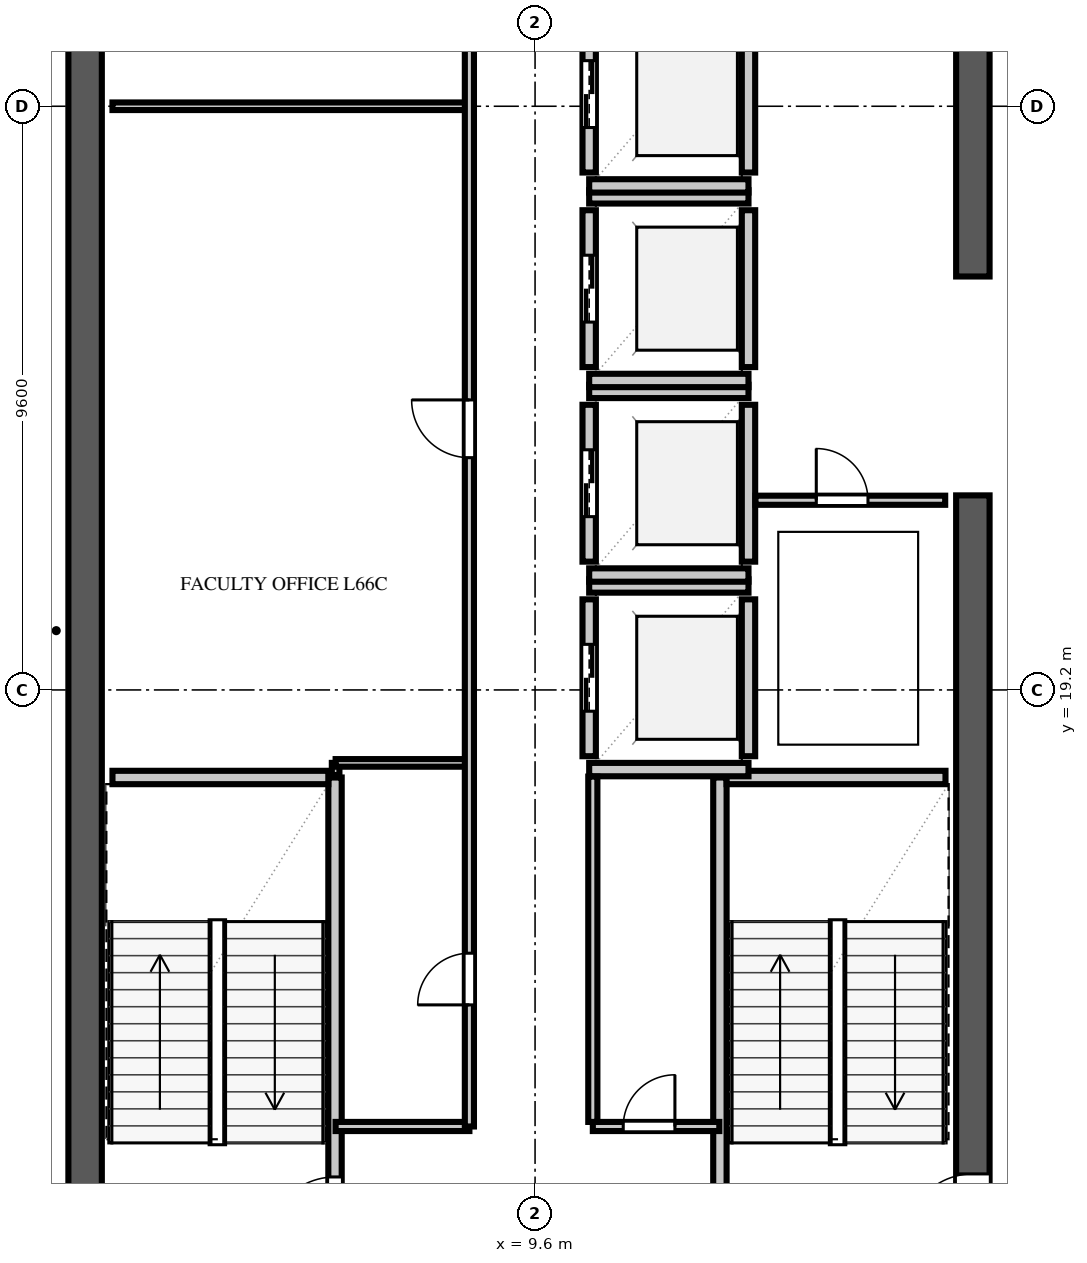
"""IFC4 building model, lengths in metres.
Left out: names, types, materials, properties, quantities, classifications, styles, units other than length and angle.
Written with IfcOpenShell. Run it as: python <this file> out.ifc"""

import sys

from ifc_helpers import new_model, si_unit, direction, frame, frame_2d, origin, place, context, subcontext, project, spatial, rectangle, extrude, element, fill, save


model = new_model("IFC4")
c1 = context("Model", 3, precision=1e-05, world=origin(), true_north=direction((0.0, 1.0)))
c2 = subcontext(c1, "Body", "Model", "MODEL_VIEW")
j1 = project(units=[si_unit("LENGTHUNIT", "METRE"), si_unit("PLANEANGLEUNIT", "RADIAN")], contexts=[c1])
p1 = place(None, origin())
s1 = spatial("IfcSite", under=j1, at=p1, CompositionType="ELEMENT")
p2 = place(p1, origin())
s2 = spatial("IfcBuilding", under=s1, at=p2, CompositionType="ELEMENT")
p3 = place(p2, frame((0.0, 0.0, 261.0)))
s3 = spatial("IfcBuildingStorey", under=s2, at=p3, CompositionType="ELEMENT", Elevation=261.0)
p4 = place(p3, frame((2.2, 9.325, 0.0), z_axis=(0.0, 0.0, 1.0), x_axis=(0.0, 1.0, 0.0)))
e1 = element("IfcWall", 1, at=p4, inside=s3, PredefinedType="SHEAR", context=c2, shape_type="SweptSolid", body=[
    extrude(rectangle(XDim=38.95, YDim=0.55, at=frame_2d((19.475, 0.0))), origin(), (0.0, 0.0, 1.0), 4.54),
])
p5 = place(p3, frame((16.8, 9.875, 0.0), z_axis=(0.0, 0.0, 1.0), x_axis=(0.0, 1.0, 0.0)))
e2 = element("IfcWall", 2, at=p5, inside=s3, PredefinedType="SHEAR", context=c2, shape_type="SweptSolid", body=[
    extrude(rectangle(XDim=12.525, YDim=0.55, at=frame_2d((6.262, 0.0))), origin(), (0.0, 0.0, 1.0), 4.54),
])
p6 = place(p5, frame((0.265, 0.0, 0.0)))
e3 = element("IfcOpeningElement", 3, at=p6, cuts=e2, PredefinedType="OPENING", context=c2, shape_type="SweptSolid", body=[
    extrude(rectangle(XDim=1.1, YDim=2.2, at=frame_2d((0.55, 1.1))), frame((0.0, 0.287, 0.0), z_axis=(0.0, -1.0, 0.0), x_axis=(1.0, 0.0, 0.0)), (0.0, 0.0, 1.0), 0.574),
])
p7 = place(p3, frame((16.8, 26.0, 0.0), z_axis=(0.0, 0.0, 1.0), x_axis=(0.0, 1.0, 0.0)))
e4 = element("IfcWall", 4, at=p7, inside=s3, PredefinedType="SHEAR", context=c2, shape_type="SweptSolid", body=[
    extrude(rectangle(XDim=7.8, YDim=0.55, at=frame_2d((3.9, 0.0))), origin(), (0.0, 0.0, 1.0), 4.54),
])
p8 = place(p3, frame((6.31, 9.95, 0.0), z_axis=(0.0, 0.0, 1.0), x_axis=(0.0, 1.0, 0.0)))
e5 = element("IfcWall", 5, at=p8, inside=s3, PredefinedType="SOLIDWALL", context=c2, shape_type="SweptSolid", body=[
    extrude(rectangle(XDim=7.81, YDim=0.22, at=frame_2d((3.905, 0.0))), origin(), (0.0, 0.0, 1.0), 4.54),
])
p9 = place(p8, frame((0.14, 0.0, 0.0)))
e6 = element("IfcOpeningElement", 6, at=p9, cuts=e5, PredefinedType="OPENING", context=c2, shape_type="SweptSolid", body=[
    extrude(rectangle(XDim=1.1, YDim=2.2, at=frame_2d((0.55, 1.1))), frame((0.0, 0.122, 0.0), z_axis=(0.0, -1.0, 0.0), x_axis=(1.0, 0.0, 0.0)), (0.0, 0.0, 1.0), 0.244),
])
p10 = place(p3, frame((2.65, 17.76, 0.0), z_axis=(0.0, 0.0, 1.0), x_axis=(1.0, 0.0, 0.0)))
e7 = element("IfcWall", 7, at=p10, inside=s3, PredefinedType="SOLIDWALL", context=c2, shape_type="SweptSolid", body=[
    extrude(rectangle(XDim=3.55, YDim=0.22, at=frame_2d((1.775, 0.0))), origin(), (0.0, 0.0, 1.0), 4.54),
])
p11 = place(p3, frame((12.64, 10.05, 0.0), z_axis=(0.0, 0.0, 1.0), x_axis=(0.0, 1.0, 0.0)))
e8 = element("IfcWall", 8, at=p11, inside=s3, PredefinedType="SOLIDWALL", context=c2, shape_type="SweptSolid", body=[
    extrude(rectangle(XDim=7.71, YDim=0.22, at=frame_2d((3.855, 0.0))), origin(), (0.0, 0.0, 1.0), 4.54),
])
p12 = place(p3, frame((12.75, 17.76, 0.0), z_axis=(0.0, 0.0, 1.0), x_axis=(1.0, 0.0, 0.0)))
e9 = element("IfcWall", 9, at=p12, inside=s3, PredefinedType="SOLIDWALL", context=c2, shape_type="SweptSolid", body=[
    extrude(rectangle(XDim=3.6, YDim=0.22, at=frame_2d((1.8, 0.0))), origin(), (0.0, 0.0, 1.0), 4.54),
])
p13 = place(p3, frame((10.49, 18.11, 0.0), z_axis=(0.0, 0.0, 1.0), x_axis=(0.0, 1.0, 0.0)))
e10 = element("IfcWall", 10, at=p13, inside=s3, PredefinedType="SOLIDWALL", context=c2, shape_type="SweptSolid", body=[
    extrude(rectangle(XDim=2.58, YDim=0.22, at=frame_2d((1.29, 0.0))), origin(), (0.0, 0.0, 1.0), 4.54),
])
p14 = place(p13, frame((0.74, 0.0, 0.0)))
e11 = element("IfcOpeningElement", 11, at=p14, cuts=e10, PredefinedType="OPENING", context=c2, shape_type="SweptSolid", body=[
    extrude(rectangle(XDim=1.1, YDim=2.2, at=frame_2d((0.55, 1.1))), frame((0.0, 0.122, 0.0), z_axis=(0.0, -1.0, 0.0), x_axis=(1.0, 0.0, 0.0)), (0.0, 0.0, 1.0), 0.244),
])
p15 = place(p3, frame((13.11, 18.11, 0.0), z_axis=(0.0, 0.0, 1.0), x_axis=(0.0, 1.0, 0.0)))
e12 = element("IfcWall", 12, at=p15, inside=s3, PredefinedType="SOLIDWALL", context=c2, shape_type="SweptSolid", body=[
    extrude(rectangle(XDim=2.58, YDim=0.22, at=frame_2d((1.29, 0.0))), origin(), (0.0, 0.0, 1.0), 4.54),
])
for number, where, z_axis, x_axis in (
    (13, (10.49, 17.89, 0.0), (0.0, 0.0, 1.0), (1.0, 0.0, 0.0)),
    (14, (10.49, 20.91, 0.0), (0.0, 0.0, 1.0), (1.0, 0.0, 0.0)),
):
    element("IfcWall", number, at=place(p3, frame(where, z_axis=z_axis, x_axis=x_axis)), inside=s3, PredefinedType="SOLIDWALL", context=c2, shape_type="SweptSolid", body=[
        extrude(rectangle(XDim=2.62, YDim=0.22, at=frame_2d((1.31, 0.0))), origin(), (0.0, 0.0, 1.0), 4.54),
    ])
p16 = place(p3, frame((10.49, 21.31, 0.0), z_axis=(0.0, 0.0, 1.0), x_axis=(0.0, 1.0, 0.0)))
e15 = element("IfcWall", 15, at=p16, inside=s3, PredefinedType="SOLIDWALL", context=c2, shape_type="SweptSolid", body=[
    extrude(rectangle(XDim=2.58, YDim=0.22, at=frame_2d((1.29, 0.0))), origin(), (0.0, 0.0, 1.0), 4.54),
])
p17 = place(p16, frame((0.74, 0.0, 0.0)))
e16 = element("IfcOpeningElement", 16, at=p17, cuts=e15, PredefinedType="OPENING", context=c2, shape_type="SweptSolid", body=[
    extrude(rectangle(XDim=1.1, YDim=2.2, at=frame_2d((0.55, 1.1))), frame((0.0, 0.122, 0.0), z_axis=(0.0, -1.0, 0.0), x_axis=(1.0, 0.0, 0.0)), (0.0, 0.0, 1.0), 0.244),
])
p18 = place(p3, frame((13.11, 21.31, 0.0), z_axis=(0.0, 0.0, 1.0), x_axis=(0.0, 1.0, 0.0)))
e17 = element("IfcWall", 17, at=p18, inside=s3, PredefinedType="SOLIDWALL", context=c2, shape_type="SweptSolid", body=[
    extrude(rectangle(XDim=2.58, YDim=0.22, at=frame_2d((1.29, 0.0))), origin(), (0.0, 0.0, 1.0), 4.54),
])
for number, where, z_axis, x_axis in (
    (18, (10.49, 21.09, 0.0), (0.0, 0.0, 1.0), (1.0, 0.0, 0.0)),
    (19, (10.49, 24.11, 0.0), (0.0, 0.0, 1.0), (1.0, 0.0, 0.0)),
):
    element("IfcWall", number, at=place(p3, frame(where, z_axis=z_axis, x_axis=x_axis)), inside=s3, PredefinedType="SOLIDWALL", context=c2, shape_type="SweptSolid", body=[
        extrude(rectangle(XDim=2.62, YDim=0.22, at=frame_2d((1.31, 0.0))), origin(), (0.0, 0.0, 1.0), 4.54),
    ])
p19 = place(p3, frame((10.49, 24.51, 0.0), z_axis=(0.0, 0.0, 1.0), x_axis=(0.0, 1.0, 0.0)))
e20 = element("IfcWall", 20, at=p19, inside=s3, PredefinedType="SOLIDWALL", context=c2, shape_type="SweptSolid", body=[
    extrude(rectangle(XDim=2.58, YDim=0.22, at=frame_2d((1.29, 0.0))), origin(), (0.0, 0.0, 1.0), 4.54),
])
p20 = place(p19, frame((0.74, 0.0, 0.0)))
e21 = element("IfcOpeningElement", 21, at=p20, cuts=e20, PredefinedType="OPENING", context=c2, shape_type="SweptSolid", body=[
    extrude(rectangle(XDim=1.1, YDim=2.2, at=frame_2d((0.55, 1.1))), frame((0.0, 0.122, 0.0), z_axis=(0.0, -1.0, 0.0), x_axis=(1.0, 0.0, 0.0)), (0.0, 0.0, 1.0), 0.244),
])
p21 = place(p3, frame((13.11, 24.51, 0.0), z_axis=(0.0, 0.0, 1.0), x_axis=(0.0, 1.0, 0.0)))
e22 = element("IfcWall", 22, at=p21, inside=s3, PredefinedType="SOLIDWALL", context=c2, shape_type="SweptSolid", body=[
    extrude(rectangle(XDim=2.58, YDim=0.22, at=frame_2d((1.29, 0.0))), origin(), (0.0, 0.0, 1.0), 4.54),
])
for number, where, z_axis, x_axis in (
    (23, (10.49, 24.29, 0.0), (0.0, 0.0, 1.0), (1.0, 0.0, 0.0)),
    (24, (10.49, 27.31, 0.0), (0.0, 0.0, 1.0), (1.0, 0.0, 0.0)),
):
    element("IfcWall", number, at=place(p3, frame(where, z_axis=z_axis, x_axis=x_axis)), inside=s3, PredefinedType="SOLIDWALL", context=c2, shape_type="SweptSolid", body=[
        extrude(rectangle(XDim=2.62, YDim=0.22, at=frame_2d((1.31, 0.0))), origin(), (0.0, 0.0, 1.0), 4.54),
    ])
p22 = place(p3, frame((10.49, 27.71, 0.0), z_axis=(0.0, 0.0, 1.0), x_axis=(0.0, 1.0, 0.0)))
e25 = element("IfcWall", 25, at=p22, inside=s3, PredefinedType="SOLIDWALL", context=c2, shape_type="SweptSolid", body=[
    extrude(rectangle(XDim=2.58, YDim=0.22, at=frame_2d((1.29, 0.0))), origin(), (0.0, 0.0, 1.0), 4.54),
])
p23 = place(p22, frame((0.74, 0.0, 0.0)))
e26 = element("IfcOpeningElement", 26, at=p23, cuts=e25, PredefinedType="OPENING", context=c2, shape_type="SweptSolid", body=[
    extrude(rectangle(XDim=1.1, YDim=2.2, at=frame_2d((0.55, 1.1))), frame((0.0, 0.122, 0.0), z_axis=(0.0, -1.0, 0.0), x_axis=(1.0, 0.0, 0.0)), (0.0, 0.0, 1.0), 0.244),
])
p24 = place(p3, frame((13.11, 27.71, 0.0), z_axis=(0.0, 0.0, 1.0), x_axis=(0.0, 1.0, 0.0)))
e27 = element("IfcWall", 27, at=p24, inside=s3, PredefinedType="SOLIDWALL", context=c2, shape_type="SweptSolid", body=[
    extrude(rectangle(XDim=2.58, YDim=0.22, at=frame_2d((1.29, 0.0))), origin(), (0.0, 0.0, 1.0), 4.54),
])
p25 = place(p3, frame((10.49, 27.49, 0.0), z_axis=(0.0, 0.0, 1.0), x_axis=(1.0, 0.0, 0.0)))
e28 = element("IfcWall", 28, at=p25, inside=s3, PredefinedType="SOLIDWALL", context=c2, shape_type="SweptSolid", body=[
    extrude(rectangle(XDim=2.62, YDim=0.22, at=frame_2d((1.31, 0.0))), origin(), (0.0, 0.0, 1.0), 4.54),
])
p26 = place(p3, frame((10.55, 12.02, 0.0), z_axis=(0.0, 0.0, 1.0), x_axis=(1.0, 0.0, 0.0)))
e29 = element("IfcWall", 29, at=p26, inside=s3, PredefinedType="PARTITIONING", context=c2, shape_type="SweptSolid", body=[
    extrude(rectangle(XDim=2.08, YDim=0.15, at=frame_2d((1.04, 0.0))), origin(), (0.0, 0.0, 1.0), 4.54),
])
p27 = place(p26, frame((0.5, 0.0, 0.0)))
e30 = element("IfcOpeningElement", 30, at=p27, cuts=e29, PredefinedType="OPENING", context=c2, shape_type="SweptSolid", body=[
    extrude(rectangle(XDim=0.85, YDim=2.1, at=frame_2d((0.425, 1.05))), frame((0.0, 0.087, 0.0), z_axis=(0.0, -1.0, 0.0), x_axis=(1.0, 0.0, 0.0)), (0.0, 0.0, 1.0), 0.174),
])
p28 = place(p3, frame((10.55, 12.095, 0.0), z_axis=(0.0, 0.0, 1.0), x_axis=(0.0, 1.0, 0.0)))
e31 = element("IfcWall", 31, at=p28, inside=s3, PredefinedType="PARTITIONING", context=c2, shape_type="SweptSolid", body=[
    extrude(rectangle(XDim=5.68, YDim=0.15, at=frame_2d((2.84, 0.0))), origin(), (0.0, 0.0, 1.0), 4.54),
])
p29 = place(p3, frame((13.225, 22.32, 0.0), z_axis=(0.0, 0.0, 1.0), x_axis=(1.0, 0.0, 0.0)))
e32 = element("IfcWall", 32, at=p29, inside=s3, PredefinedType="PARTITIONING", context=c2, shape_type="SweptSolid", body=[
    extrude(rectangle(XDim=3.12, YDim=0.15, at=frame_2d((1.56, 0.0))), origin(), (0.0, 0.0, 1.0), 4.54),
])
p30 = place(p29, frame((1.0, 0.0, 0.0)))
e33 = element("IfcOpeningElement", 33, at=p30, cuts=e32, PredefinedType="OPENING", context=c2, shape_type="SweptSolid", body=[
    extrude(rectangle(XDim=0.85, YDim=2.1, at=frame_2d((0.425, 1.05))), frame((0.0, 0.087, 0.0), z_axis=(0.0, -1.0, 0.0), x_axis=(1.0, 0.0, 0.0)), (0.0, 0.0, 1.0), 0.174),
])
p31 = place(p3, frame((6.32, 12.02, 0.0), z_axis=(0.0, 0.0, 1.0), x_axis=(1.0, 0.0, 0.0)))
e34 = element("IfcWall", 34, at=p31, inside=s3, PredefinedType="PARTITIONING", context=c2, shape_type="SweptSolid", body=[
    extrude(rectangle(XDim=2.2, YDim=0.15, at=frame_2d((1.1, 0.0))), origin(), (0.0, 0.0, 1.0), 4.54),
])
p32 = place(p3, frame((6.32, 17.8, 0.0), z_axis=(0.0, 0.0, 1.0), x_axis=(0.0, 1.0, 0.0)))
e35 = element("IfcWall", 35, at=p32, inside=s3, PredefinedType="PARTITIONING", context=c2, shape_type="SweptSolid", body=[
    extrude(rectangle(XDim=0.2, YDim=0.125, at=frame_2d((0.1, 0.0))), origin(), (0.0, 0.0, 1.0), 4.54),
])
p33 = place(p3, frame((6.32, 18.0, 0.0), z_axis=(0.0, 0.0, 1.0), x_axis=(1.0, 0.0, 0.0)))
e36 = element("IfcWall", 36, at=p33, inside=s3, PredefinedType="PARTITIONING", context=c2, shape_type="SweptSolid", body=[
    extrude(rectangle(XDim=2.2, YDim=0.125, at=frame_2d((1.1, 0.0))), origin(), (0.0, 0.0, 1.0), 4.54),
])
p34 = place(p3, frame((2.65, 28.8, 0.0), z_axis=(0.0, 0.0, 1.0), x_axis=(1.0, 0.0, 0.0)))
e37 = element("IfcWall", 37, at=p34, inside=s3, PredefinedType="PARTITIONING", context=c2, shape_type="SweptSolid", body=[
    extrude(rectangle(XDim=5.87, YDim=0.125, at=frame_2d((2.935, 0.0))), origin(), (0.0, 0.0, 1.0), 4.54),
])
p35 = place(p3, frame((8.52, 12.02, 0.0), z_axis=(0.0, 0.0, 1.0), x_axis=(0.0, 1.0, 0.0)))
e38 = element("IfcWall", 38, at=p35, inside=s3, PredefinedType="PARTITIONING", context=c2, shape_type="SweptSolid", body=[
    extrude(rectangle(XDim=24.76, YDim=0.15, at=frame_2d((12.38, 0.0))), origin(), (0.0, 0.0, 1.0), 4.54),
])
p36 = place(p35, frame((2.0, 0.0, 0.0)))
e39 = element("IfcOpeningElement", 39, at=p36, cuts=e38, PredefinedType="OPENING", context=c2, shape_type="SweptSolid", body=[
    extrude(rectangle(XDim=0.85, YDim=2.1, at=frame_2d((0.425, 1.05))), frame((0.0, 0.087, 0.0), z_axis=(0.0, -1.0, 0.0), x_axis=(1.0, 0.0, 0.0)), (0.0, 0.0, 1.0), 0.174),
])
p37 = place(p35, frame((11.0, 0.0, 0.0)))
e40 = element("IfcOpeningElement", 40, at=p37, cuts=e38, PredefinedType="OPENING", context=c2, shape_type="SweptSolid", body=[
    extrude(rectangle(XDim=0.95, YDim=2.15, at=frame_2d((0.475, 1.075))), frame((0.0, 0.087, 0.0), z_axis=(0.0, -1.0, 0.0), x_axis=(1.0, 0.0, 0.0)), (0.0, 0.0, 1.0), 0.174),
])
p38 = place(p35, frame((18.0, 0.0, 0.0)))
e41 = element("IfcOpeningElement", 41, at=p38, cuts=e38, PredefinedType="OPENING", context=c2, shape_type="SweptSolid", body=[
    extrude(rectangle(XDim=0.95, YDim=2.15, at=frame_2d((0.475, 1.075))), frame((0.0, 0.087, 0.0), z_axis=(0.0, -1.0, 0.0), x_axis=(1.0, 0.0, 0.0)), (0.0, 0.0, 1.0), 0.174),
])
p39 = place(p9, origin())
e42 = element("IfcDoor", 42, at=p39, inside=s3, OperationType="SINGLE_SWING_LEFT", PredefinedType="DOOR", context=c2, shape_type="SweptSolid", body=[
    extrude(rectangle(XDim=1.1, YDim=2.2, at=frame_2d((0.55, 1.1))), frame((0.0, 0.025, 0.0), z_axis=(0.0, -1.0, 0.0), x_axis=(1.0, 0.0, 0.0)), (0.0, 0.0, 1.0), 0.05),
])
fill(e6, e42)
p40 = place(p6, origin())
e43 = element("IfcDoor", 43, at=p40, inside=s3, OperationType="SINGLE_SWING_LEFT", PredefinedType="DOOR", context=c2, shape_type="SweptSolid", body=[
    extrude(rectangle(XDim=1.1, YDim=2.2, at=frame_2d((0.55, 1.1))), frame((0.0, 0.025, 0.0), z_axis=(0.0, -1.0, 0.0), x_axis=(1.0, 0.0, 0.0)), (0.0, 0.0, 1.0), 0.05),
])
fill(e3, e43)
p41 = place(p14, origin())
e44 = element("IfcDoor", 44, at=p41, inside=s3, OperationType="DOUBLE_DOOR_SLIDING", PredefinedType="DOOR", context=c2, shape_type="SweptSolid", body=[
    extrude(rectangle(XDim=1.1, YDim=2.2, at=frame_2d((0.55, 1.1))), frame((0.0, 0.025, 0.0), z_axis=(0.0, -1.0, 0.0), x_axis=(1.0, 0.0, 0.0)), (0.0, 0.0, 1.0), 0.05),
])
fill(e11, e44)
p42 = place(p17, origin())
e45 = element("IfcDoor", 45, at=p42, inside=s3, OperationType="DOUBLE_DOOR_SLIDING", PredefinedType="DOOR", context=c2, shape_type="SweptSolid", body=[
    extrude(rectangle(XDim=1.1, YDim=2.2, at=frame_2d((0.55, 1.1))), frame((0.0, 0.025, 0.0), z_axis=(0.0, -1.0, 0.0), x_axis=(1.0, 0.0, 0.0)), (0.0, 0.0, 1.0), 0.05),
])
fill(e16, e45)
p43 = place(p20, origin())
e46 = element("IfcDoor", 46, at=p43, inside=s3, OperationType="DOUBLE_DOOR_SLIDING", PredefinedType="DOOR", context=c2, shape_type="SweptSolid", body=[
    extrude(rectangle(XDim=1.1, YDim=2.2, at=frame_2d((0.55, 1.1))), frame((0.0, 0.025, 0.0), z_axis=(0.0, -1.0, 0.0), x_axis=(1.0, 0.0, 0.0)), (0.0, 0.0, 1.0), 0.05),
])
fill(e21, e46)
p44 = place(p23, origin())
e47 = element("IfcDoor", 47, at=p44, inside=s3, OperationType="DOUBLE_DOOR_SLIDING", PredefinedType="DOOR", context=c2, shape_type="SweptSolid", body=[
    extrude(rectangle(XDim=1.1, YDim=2.2, at=frame_2d((0.55, 1.1))), frame((0.0, 0.025, 0.0), z_axis=(0.0, -1.0, 0.0), x_axis=(1.0, 0.0, 0.0)), (0.0, 0.0, 1.0), 0.05),
])
fill(e26, e47)
p45 = place(p27, origin())
e48 = element("IfcDoor", 48, at=p45, inside=s3, OperationType="SINGLE_SWING_RIGHT", PredefinedType="DOOR", context=c2, shape_type="SweptSolid", body=[
    extrude(rectangle(XDim=0.85, YDim=2.1, at=frame_2d((0.425, 1.05))), frame((0.0, 0.025, 0.0), z_axis=(0.0, -1.0, 0.0), x_axis=(1.0, 0.0, 0.0)), (0.0, 0.0, 1.0), 0.05),
])
fill(e30, e48)
p46 = place(p30, origin())
e49 = element("IfcDoor", 49, at=p46, inside=s3, OperationType="SINGLE_SWING_LEFT", PredefinedType="DOOR", context=c2, shape_type="SweptSolid", body=[
    extrude(rectangle(XDim=0.85, YDim=2.1, at=frame_2d((0.425, 1.05))), frame((0.0, 0.025, 0.0), z_axis=(0.0, -1.0, 0.0), x_axis=(1.0, 0.0, 0.0)), (0.0, 0.0, 1.0), 0.05),
])
fill(e33, e49)
p47 = place(p36, origin())
e50 = element("IfcDoor", 50, at=p47, inside=s3, OperationType="SINGLE_SWING_LEFT", PredefinedType="DOOR", context=c2, shape_type="SweptSolid", body=[
    extrude(rectangle(XDim=0.85, YDim=2.1, at=frame_2d((0.425, 1.05))), frame((0.0, 0.025, 0.0), z_axis=(0.0, -1.0, 0.0), x_axis=(1.0, 0.0, 0.0)), (0.0, 0.0, 1.0), 0.05),
])
fill(e39, e50)
p48 = place(p37, origin())
e51 = element("IfcDoor", 51, at=p48, inside=s3, OperationType="SINGLE_SWING_RIGHT", PredefinedType="DOOR", context=c2, shape_type="SweptSolid", body=[
    extrude(rectangle(XDim=0.95, YDim=2.15, at=frame_2d((0.475, 1.075))), frame((0.0, 0.025, 0.0), z_axis=(0.0, -1.0, 0.0), x_axis=(1.0, 0.0, 0.0)), (0.0, 0.0, 1.0), 0.05),
])
fill(e40, e51)
save(model, sys.argv[1])
